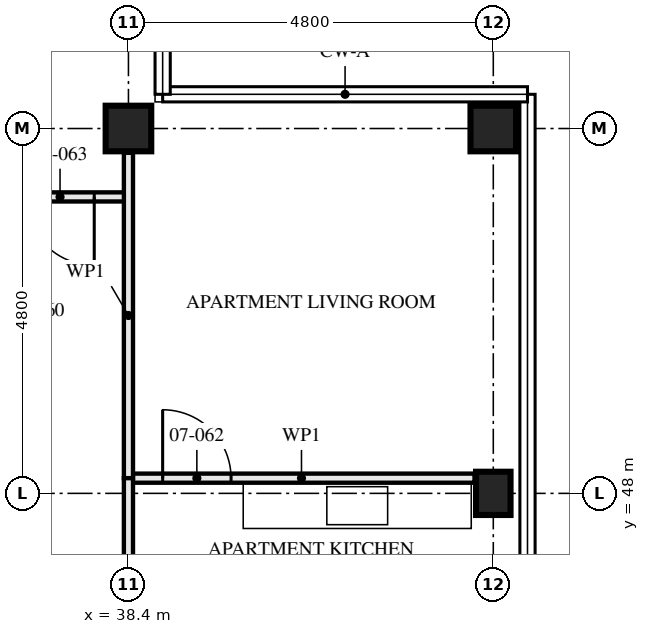
"""IFC4 building model, lengths in metres.
Left out: names, types, materials, properties, quantities, classifications, styles, units other than length and angle.
Written with IfcOpenShell. Run it as: python <this file> out.ifc"""

import sys

from ifc_helpers import new_model, si_unit, direction, frame, frame_2d, origin, origin_2d, place, context, subcontext, project, spatial, rectangle, hollow_rectangle, i_section, extrude, element, fill, save


model = new_model("IFC4")
c1 = context("Model", 3, precision=1e-05, world=origin(), true_north=direction((0.0, 1.0)))
c2 = subcontext(c1, "Body", "Model", "MODEL_VIEW")
j1 = project(units=[si_unit("LENGTHUNIT", "METRE"), si_unit("PLANEANGLEUNIT", "RADIAN")], contexts=[c1])
p1 = place(None, origin())
s1 = spatial("IfcSite", under=j1, at=p1, CompositionType="ELEMENT")
p2 = place(p1, origin())
s2 = spatial("IfcBuilding", under=s1, at=p2, CompositionType="ELEMENT")
p3 = place(p2, frame((0.0, 0.0, 30.5)))
s3 = spatial("IfcBuildingStorey", under=s2, at=p3, CompositionType="ELEMENT", Elevation=30.5)
p4 = place(p3, frame((38.4, 52.8, 0.0), z_axis=(0.0, 0.0, 1.0), x_axis=(0.0, 1.0, 0.0)))
e1 = element("IfcColumn", 1, at=p4, inside=s3, PredefinedType="COLUMN", context=c2, shape_type="SweptSolid", body=[
    extrude(hollow_rectangle(XDim=0.6, YDim=0.6, WallThickness=0.05, at=origin_2d()), origin(), (0.0, 0.0, 1.0), 3.5),
])
p5 = place(p3, frame((43.2, 48.0, 0.0), z_axis=(0.0, 0.0, 1.0), x_axis=(1.0, 0.0, 0.0)))
e2 = element("IfcColumn", 2, at=p5, inside=s3, PredefinedType="COLUMN", context=c2, shape_type="SweptSolid", body=[
    extrude(i_section(OverallWidth=0.454, OverallDepth=0.569, WebThickness=0.078, FlangeThickness=0.125, FilletRadius=0.015, at=origin_2d()), origin(), (0.0, 0.0, 1.0), 3.5),
])
p6 = place(p3, frame((43.2, 52.8, 0.0), z_axis=(0.0, 0.0, 1.0), x_axis=(0.0, 1.0, 0.0)))
e3 = element("IfcColumn", 3, at=p6, inside=s3, PredefinedType="COLUMN", context=c2, shape_type="SweptSolid", body=[
    extrude(hollow_rectangle(XDim=0.6, YDim=0.6, WallThickness=0.05, at=origin_2d()), origin(), (0.0, 0.0, 1.0), 3.5),
])
p7 = place(p3, frame((38.4, 48.2, 0.0), z_axis=(0.0, 0.0, 1.0), x_axis=(0.0, -1.0, 0.0)))
e4 = element("IfcWall", 4, at=p7, inside=s3, PredefinedType="PARTITIONING", context=c2, shape_type="SweptSolid", body=[
    extrude(rectangle(XDim=3.0, YDim=0.12, at=frame_2d((1.5, 0.0))), origin(), (0.0, 0.0, 1.0), 2.55),
])
p8 = place(p7, frame((1.075, 0.0, 0.0)))
e5 = element("IfcOpeningElement", 5, at=p8, cuts=e4, PredefinedType="OPENING", context=c2, shape_type="SweptSolid", body=[
    extrude(rectangle(XDim=0.9, YDim=2.1, at=frame_2d((0.45, 1.05))), frame((0.0, 0.071, 0.0), z_axis=(0.0, -1.0, 0.0), x_axis=(1.0, 0.0, 0.0)), (0.0, 0.0, 1.0), 0.141),
])
p9 = place(p3, frame((42.953, 48.2, 0.0), z_axis=(0.0, 0.0, 1.0), x_axis=(-1.0, 0.0, 0.0)))
e6 = element("IfcWall", 6, at=p9, inside=s3, PredefinedType="PARTITIONING", context=c2, shape_type="SweptSolid", body=[
    extrude(rectangle(XDim=4.553, YDim=0.12, at=frame_2d((2.276, 0.0))), origin(), (0.0, 0.0, 1.0), 3.33),
])
p10 = place(p9, frame((3.203, 0.0, 0.0)))
e7 = element("IfcOpeningElement", 7, at=p10, cuts=e6, PredefinedType="OPENING", context=c2, shape_type="SweptSolid", body=[
    extrude(rectangle(XDim=0.9, YDim=2.1, at=frame_2d((0.45, 1.05))), frame((0.0, 0.071, 0.0), z_axis=(0.0, -1.0, 0.0), x_axis=(1.0, 0.0, 0.0)), (0.0, 0.0, 1.0), 0.141),
])
p11 = place(p3, frame((38.4, 51.9, 0.0), z_axis=(0.0, 0.0, 1.0), x_axis=(-1.0, 0.0, 0.0)))
e8 = element("IfcWall", 8, at=p11, inside=s3, PredefinedType="PARTITIONING", context=c2, shape_type="SweptSolid", body=[
    extrude(rectangle(XDim=4.8, YDim=0.12, at=frame_2d((2.4, 0.0))), origin(), (0.0, 0.0, 1.0), 3.33),
])
p12 = place(p11, frame((0.45, 0.0, 0.0)))
e9 = element("IfcOpeningElement", 9, at=p12, cuts=e8, PredefinedType="OPENING", context=c2, shape_type="SweptSolid", body=[
    extrude(rectangle(XDim=0.9, YDim=2.1, at=frame_2d((0.45, 1.05))), frame((0.0, 0.071, 0.0), z_axis=(0.0, -1.0, 0.0), x_axis=(1.0, 0.0, 0.0)), (0.0, 0.0, 1.0), 0.141),
])
p13 = place(p3, frame((38.4, 52.48, 0.0), z_axis=(0.0, 0.0, 1.0), x_axis=(0.0, -1.0, 0.0)))
e10 = element("IfcWall", 10, at=p13, inside=s3, PredefinedType="PARTITIONING", context=c2, shape_type="SweptSolid", body=[
    extrude(rectangle(XDim=4.28, YDim=0.12, at=frame_2d((2.14, 0.0))), origin(), (0.0, 0.0, 1.0), 3.33),
])
p14 = place(p10, frame((0.9, 0.0, 0.0), z_axis=(0.0, 0.0, 1.0), x_axis=(-1.0, 0.0, 0.0)))
e11 = element("IfcDoor", 11, at=p14, inside=s3, OperationType="SINGLE_SWING_RIGHT", PredefinedType="DOOR", context=c2, shape_type="SweptSolid", body=[
    extrude(rectangle(XDim=0.9, YDim=2.1, at=frame_2d((0.45, 1.05))), frame((0.0, 0.022, 0.0), z_axis=(0.0, -1.0, 0.0), x_axis=(1.0, 0.0, 0.0)), (0.0, 0.0, 1.0), 0.044),
])
fill(e7, e11)
p15 = place(p12, origin())
e12 = element("IfcDoor", 12, at=p15, inside=s3, OperationType="SINGLE_SWING_RIGHT", PredefinedType="DOOR", context=c2, shape_type="SweptSolid", body=[
    extrude(rectangle(XDim=0.9, YDim=2.1, at=frame_2d((0.45, 1.05))), frame((0.0, 0.022, 0.0), z_axis=(0.0, -1.0, 0.0), x_axis=(1.0, 0.0, 0.0)), (0.0, 0.0, 1.0), 0.044),
])
fill(e9, e12)
save(model, sys.argv[1])
